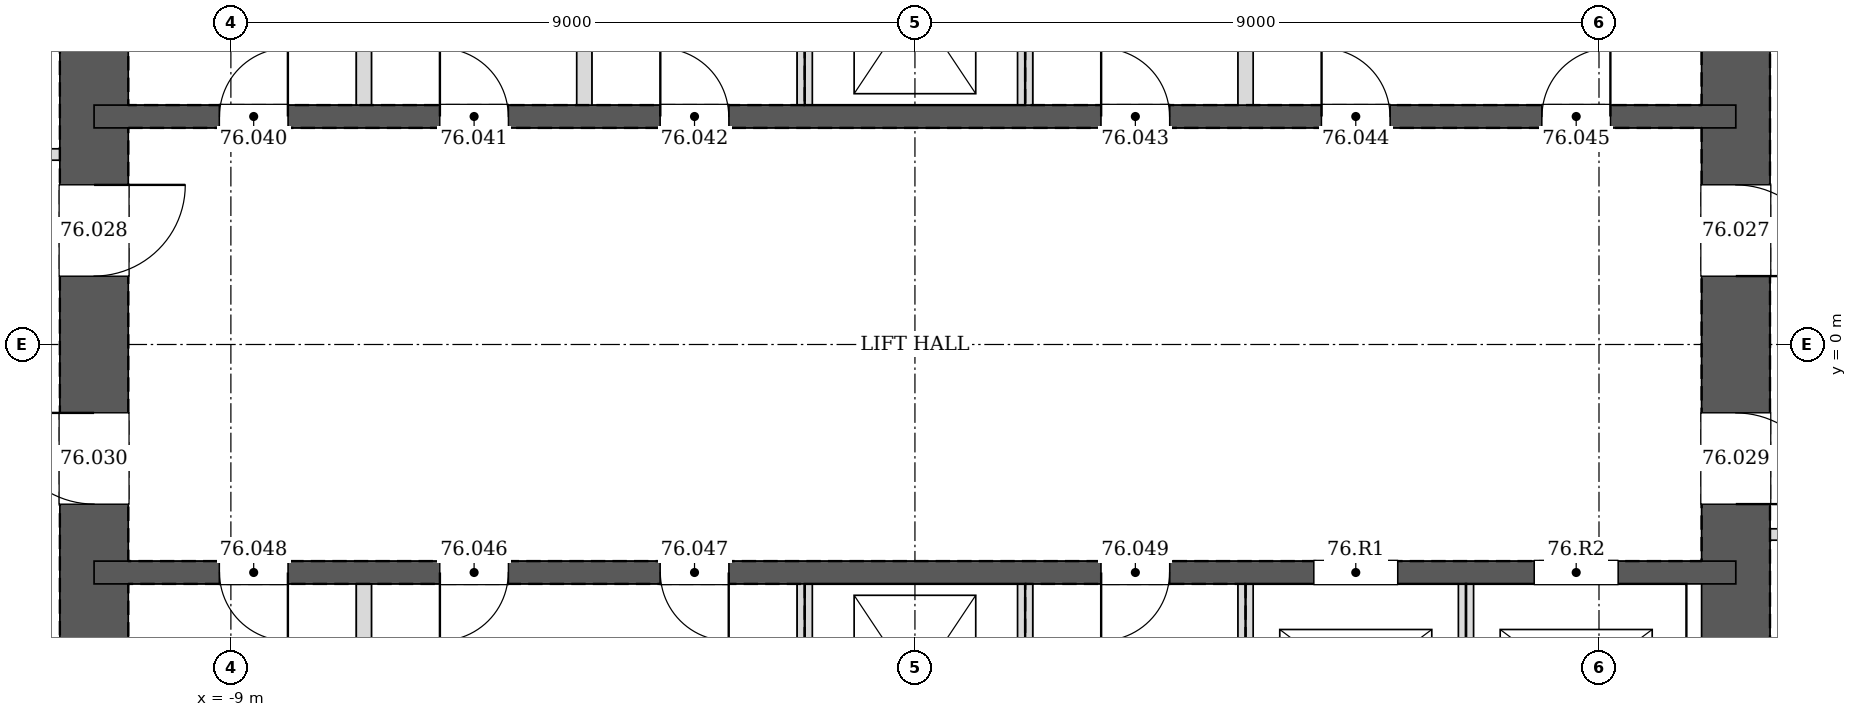
"""IFC4 building model, lengths in metres.
Left out: names, types, materials, properties, quantities, classifications, styles, units other than length and angle.
Written with IfcOpenShell. Run it as: python <this file> out.ifc"""

import sys

from ifc_helpers import new_model, si_unit, direction, frame, frame_2d, origin, place, context, subcontext, project, spatial, rectangle, extrude, element, fill, save


model = new_model("IFC4")
c1 = context("Model", 3, precision=1e-05, world=origin(), true_north=direction((0.0, 1.0)))
c2 = subcontext(c1, "Body", "Model", "MODEL_VIEW")
j1 = project(units=[si_unit("LENGTHUNIT", "METRE"), si_unit("PLANEANGLEUNIT", "RADIAN")], contexts=[c1])
p1 = place(None, origin())
s1 = spatial("IfcSite", under=j1, at=p1, CompositionType="ELEMENT")
p2 = place(p1, origin())
s2 = spatial("IfcBuilding", under=s1, at=p2, CompositionType="ELEMENT")
p3 = place(p2, frame((0.0, 0.0, 308.2)))
s3 = spatial("IfcBuildingStorey", under=s2, at=p3, CompositionType="ELEMENT", Elevation=308.2)
p4 = place(p3, frame((10.8, -10.8, 0.0), z_axis=(0.0, 0.0, 1.0), x_axis=(0.0, 1.0, 0.0)))
e1 = element("IfcWall", 1, at=p4, inside=s3, PredefinedType="SOLIDWALL", context=c2, shape_type="SweptSolid", body=[
    extrude(rectangle(XDim=21.6, YDim=0.9, at=frame_2d((10.8, 0.0))), origin(), (0.0, 0.0, 1.0), 3.4),
])
p5 = place(p4, frame((11.7, 0.0, 0.0)))
e2 = element("IfcOpeningElement", 2, at=p5, cuts=e1, PredefinedType="OPENING", context=c2, shape_type="SweptSolid", body=[
    extrude(rectangle(XDim=1.2, YDim=2.1, at=frame_2d((0.6, 1.05))), frame((0.0, 0.46, 0.0), z_axis=(0.0, -1.0, 0.0), x_axis=(1.0, 0.0, 0.0)), (0.0, 0.0, 1.0), 0.92),
])
p6 = place(p4, frame((8.7, 0.0, 0.0)))
e3 = element("IfcOpeningElement", 3, at=p6, cuts=e1, PredefinedType="OPENING", context=c2, shape_type="SweptSolid", body=[
    extrude(rectangle(XDim=1.2, YDim=2.1, at=frame_2d((0.6, 1.05))), frame((0.0, 0.46, 0.0), z_axis=(0.0, -1.0, 0.0), x_axis=(1.0, 0.0, 0.0)), (0.0, 0.0, 1.0), 0.92),
])
p7 = place(p3, frame((-10.8, 10.8, 0.0), z_axis=(0.0, 0.0, 1.0), x_axis=(0.0, -1.0, 0.0)))
e4 = element("IfcWall", 4, at=p7, inside=s3, PredefinedType="SOLIDWALL", context=c2, shape_type="SweptSolid", body=[
    extrude(rectangle(XDim=21.6, YDim=0.9, at=frame_2d((10.8, 0.0))), origin(), (0.0, 0.0, 1.0), 3.4),
])
p8 = place(p7, frame((8.7, 0.0, 0.0)))
e5 = element("IfcOpeningElement", 5, at=p8, cuts=e4, PredefinedType="OPENING", context=c2, shape_type="SweptSolid", body=[
    extrude(rectangle(XDim=1.2, YDim=2.1, at=frame_2d((0.6, 1.05))), frame((0.0, 0.46, 0.0), z_axis=(0.0, -1.0, 0.0), x_axis=(1.0, 0.0, 0.0)), (0.0, 0.0, 1.0), 0.92),
])
p9 = place(p7, frame((11.7, 0.0, 0.0)))
e6 = element("IfcOpeningElement", 6, at=p9, cuts=e4, PredefinedType="OPENING", context=c2, shape_type="SweptSolid", body=[
    extrude(rectangle(XDim=1.2, YDim=2.1, at=frame_2d((0.6, 1.05))), frame((0.0, 0.46, 0.0), z_axis=(0.0, -1.0, 0.0), x_axis=(1.0, 0.0, 0.0)), (0.0, 0.0, 1.0), 0.92),
])
p10 = place(p3, frame((-10.8, 3.0, 0.0), z_axis=(0.0, 0.0, 1.0), x_axis=(1.0, 0.0, 0.0)))
e7 = element("IfcWall", 7, at=p10, inside=s3, PredefinedType="SOLIDWALL", context=c2, shape_type="SweptSolid", body=[
    extrude(rectangle(XDim=21.6, YDim=0.3, at=frame_2d((10.8, 0.0))), origin(), (0.0, 0.0, 1.0), 3.4),
])
p11 = place(p10, frame((1.65, 0.0, 0.0)))
e8 = element("IfcOpeningElement", 8, at=p11, cuts=e7, PredefinedType="OPENING", context=c2, shape_type="SweptSolid", body=[
    extrude(rectangle(XDim=0.9, YDim=2.1, at=frame_2d((0.45, 1.05))), frame((0.0, 0.16, 0.0), z_axis=(0.0, -1.0, 0.0), x_axis=(1.0, 0.0, 0.0)), (0.0, 0.0, 1.0), 0.32),
])
p12 = place(p10, frame((4.55, 0.0, 0.0)))
e9 = element("IfcOpeningElement", 9, at=p12, cuts=e7, PredefinedType="OPENING", context=c2, shape_type="SweptSolid", body=[
    extrude(rectangle(XDim=0.9, YDim=2.1, at=frame_2d((0.45, 1.05))), frame((0.0, 0.16, 0.0), z_axis=(0.0, -1.0, 0.0), x_axis=(1.0, 0.0, 0.0)), (0.0, 0.0, 1.0), 0.32),
])
p13 = place(p10, frame((7.45, 0.0, 0.0)))
e10 = element("IfcOpeningElement", 10, at=p13, cuts=e7, PredefinedType="OPENING", context=c2, shape_type="SweptSolid", body=[
    extrude(rectangle(XDim=0.9, YDim=2.1, at=frame_2d((0.45, 1.05))), frame((0.0, 0.16, 0.0), z_axis=(0.0, -1.0, 0.0), x_axis=(1.0, 0.0, 0.0)), (0.0, 0.0, 1.0), 0.32),
])
p14 = place(p10, frame((13.25, 0.0, 0.0)))
e11 = element("IfcOpeningElement", 11, at=p14, cuts=e7, PredefinedType="OPENING", context=c2, shape_type="SweptSolid", body=[
    extrude(rectangle(XDim=0.9, YDim=2.1, at=frame_2d((0.45, 1.05))), frame((0.0, 0.16, 0.0), z_axis=(0.0, -1.0, 0.0), x_axis=(1.0, 0.0, 0.0)), (0.0, 0.0, 1.0), 0.32),
])
p15 = place(p10, frame((16.15, 0.0, 0.0)))
e12 = element("IfcOpeningElement", 12, at=p15, cuts=e7, PredefinedType="OPENING", context=c2, shape_type="SweptSolid", body=[
    extrude(rectangle(XDim=0.9, YDim=2.1, at=frame_2d((0.45, 1.05))), frame((0.0, 0.16, 0.0), z_axis=(0.0, -1.0, 0.0), x_axis=(1.0, 0.0, 0.0)), (0.0, 0.0, 1.0), 0.32),
])
p16 = place(p10, frame((19.05, 0.0, 0.0)))
e13 = element("IfcOpeningElement", 13, at=p16, cuts=e7, PredefinedType="OPENING", context=c2, shape_type="SweptSolid", body=[
    extrude(rectangle(XDim=0.9, YDim=2.1, at=frame_2d((0.45, 1.05))), frame((0.0, 0.16, 0.0), z_axis=(0.0, -1.0, 0.0), x_axis=(1.0, 0.0, 0.0)), (0.0, 0.0, 1.0), 0.32),
])
p17 = place(p3, frame((-10.8, -3.0, 0.0), z_axis=(0.0, 0.0, 1.0), x_axis=(1.0, 0.0, 0.0)))
e14 = element("IfcWall", 14, at=p17, inside=s3, PredefinedType="SOLIDWALL", context=c2, shape_type="SweptSolid", body=[
    extrude(rectangle(XDim=21.6, YDim=0.3, at=frame_2d((10.8, 0.0))), origin(), (0.0, 0.0, 1.0), 3.4),
])
p18 = place(p17, frame((4.55, 0.0, 0.0)))
e15 = element("IfcOpeningElement", 15, at=p18, cuts=e14, PredefinedType="OPENING", context=c2, shape_type="SweptSolid", body=[
    extrude(rectangle(XDim=0.9, YDim=2.1, at=frame_2d((0.45, 1.05))), frame((0.0, 0.16, 0.0), z_axis=(0.0, -1.0, 0.0), x_axis=(1.0, 0.0, 0.0)), (0.0, 0.0, 1.0), 0.32),
])
p19 = place(p17, frame((7.45, 0.0, 0.0)))
e16 = element("IfcOpeningElement", 16, at=p19, cuts=e14, PredefinedType="OPENING", context=c2, shape_type="SweptSolid", body=[
    extrude(rectangle(XDim=0.9, YDim=2.1, at=frame_2d((0.45, 1.05))), frame((0.0, 0.16, 0.0), z_axis=(0.0, -1.0, 0.0), x_axis=(1.0, 0.0, 0.0)), (0.0, 0.0, 1.0), 0.32),
])
p20 = place(p17, frame((1.65, 0.0, 0.0)))
e17 = element("IfcOpeningElement", 17, at=p20, cuts=e14, PredefinedType="OPENING", context=c2, shape_type="SweptSolid", body=[
    extrude(rectangle(XDim=0.9, YDim=2.1, at=frame_2d((0.45, 1.05))), frame((0.0, 0.16, 0.0), z_axis=(0.0, -1.0, 0.0), x_axis=(1.0, 0.0, 0.0)), (0.0, 0.0, 1.0), 0.32),
])
p21 = place(p17, frame((13.25, 0.0, 0.0)))
e18 = element("IfcOpeningElement", 18, at=p21, cuts=e14, PredefinedType="OPENING", context=c2, shape_type="SweptSolid", body=[
    extrude(rectangle(XDim=0.9, YDim=2.1, at=frame_2d((0.45, 1.05))), frame((0.0, 0.16, 0.0), z_axis=(0.0, -1.0, 0.0), x_axis=(1.0, 0.0, 0.0)), (0.0, 0.0, 1.0), 0.32),
])
p22 = place(p17, frame((16.05, 0.0, 0.0)))
e19 = element("IfcOpeningElement", 19, at=p22, cuts=e14, PredefinedType="OPENING", context=c2, shape_type="SweptSolid", body=[
    extrude(rectangle(XDim=1.1, YDim=2.1, at=frame_2d((0.55, 1.05))), frame((0.0, 0.16, 0.0), z_axis=(0.0, -1.0, 0.0), x_axis=(1.0, 0.0, 0.0)), (0.0, 0.0, 1.0), 0.32),
])
p23 = place(p17, frame((18.95, 0.0, 0.0)))
e20 = element("IfcOpeningElement", 20, at=p23, cuts=e14, PredefinedType="OPENING", context=c2, shape_type="SweptSolid", body=[
    extrude(rectangle(XDim=1.1, YDim=2.1, at=frame_2d((0.55, 1.05))), frame((0.0, 0.16, 0.0), z_axis=(0.0, -1.0, 0.0), x_axis=(1.0, 0.0, 0.0)), (0.0, 0.0, 1.0), 0.32),
])
p24 = place(p3, frame((11.25, -2.5, 0.0), z_axis=(0.0, 0.0, 1.0), x_axis=(1.0, 0.0, 0.0)))
e21 = element("IfcWall", 21, at=p24, inside=s3, PredefinedType="PARTITIONING", context=c2, shape_type="SweptSolid", body=[
    extrude(rectangle(XDim=1.65, YDim=0.15, at=frame_2d((0.825, 0.0))), origin(), (0.0, 0.0, 1.0), 3.2),
])
p25 = place(p3, frame((-11.25, 2.5, 0.0), z_axis=(0.0, 0.0, 1.0), x_axis=(-1.0, 0.0, 0.0)))
e22 = element("IfcWall", 22, at=p25, inside=s3, PredefinedType="PARTITIONING", context=c2, shape_type="SweptSolid", body=[
    extrude(rectangle(XDim=1.65, YDim=0.15, at=frame_2d((0.825, 0.0))), origin(), (0.0, 0.0, 1.0), 3.2),
])
p26 = place(p25, frame((0.35, 0.0, 0.0)))
e23 = element("IfcOpeningElement", 23, at=p26, cuts=e22, PredefinedType="OPENING", context=c2, shape_type="SweptSolid", body=[
    extrude(rectangle(XDim=0.95, YDim=2.1, at=frame_2d((0.475, 1.05))), frame((0.0, 0.085, 0.0), z_axis=(0.0, -1.0, 0.0), x_axis=(1.0, 0.0, 0.0)), (0.0, 0.0, 1.0), 0.17),
])
for number, where, z_axis, x_axis in (
    (24, (-7.25, 3.15, 0.0), (0.0, 0.0, 1.0), (0.0, 1.0, 0.0)),
    (25, (-4.35, 3.15, 0.0), (0.0, 0.0, 1.0), (0.0, 1.0, 0.0)),
    (26, (-1.45, 3.15, 0.0), (0.0, 0.0, 1.0), (0.0, 1.0, 0.0)),
    (27, (1.45, 3.15, 0.0), (0.0, 0.0, 1.0), (0.0, 1.0, 0.0)),
    (28, (4.35, 3.15, 0.0), (0.0, 0.0, 1.0), (0.0, 1.0, 0.0)),
    (29, (-7.25, -5.85, 0.0), (0.0, 0.0, 1.0), (0.0, 1.0, 0.0)),
    (30, (-1.45, -5.85, 0.0), (0.0, 0.0, 1.0), (0.0, 1.0, 0.0)),
    (31, (1.45, -5.85, 0.0), (0.0, 0.0, 1.0), (0.0, 1.0, 0.0)),
    (32, (4.35, -5.85, 0.0), (0.0, 0.0, 1.0), (0.0, 1.0, 0.0)),
):
    element("IfcWall", number, at=place(p3, frame(where, z_axis=z_axis, x_axis=x_axis)), inside=s3, PredefinedType="PARTITIONING", context=c2, shape_type="SweptSolid", body=[
        extrude(rectangle(XDim=2.7, YDim=0.2, at=frame_2d((1.35, 0.0))), origin(), (0.0, 0.0, 1.0), 3.2),
    ])
p27 = place(p3, frame((7.25, -5.85, 0.0), z_axis=(0.0, 0.0, 1.0), x_axis=(0.0, 1.0, 0.0)))
e33 = element("IfcWall", 33, at=p27, inside=s3, PredefinedType="PARTITIONING", context=c2, shape_type="SweptSolid", body=[
    extrude(rectangle(XDim=2.7, YDim=0.2, at=frame_2d((1.35, 0.0))), origin(), (0.0, 0.0, 1.0), 3.4),
])
p28 = place(p5, frame((1.2, 0.0, 0.0), z_axis=(0.0, 0.0, 1.0), x_axis=(-1.0, 0.0, 0.0)))
e34 = element("IfcDoor", 34, at=p28, inside=s3, OperationType="SINGLE_SWING_RIGHT", PredefinedType="DOOR", context=c2, shape_type="SweptSolid", body=[
    extrude(rectangle(XDim=1.2, YDim=2.1, at=frame_2d((0.6, 1.05))), frame((0.0, 0.025, 0.0), z_axis=(0.0, -1.0, 0.0), x_axis=(1.0, 0.0, 0.0)), (0.0, 0.0, 1.0), 0.05),
])
fill(e2, e34)
p29 = place(p8, origin())
e35 = element("IfcDoor", 35, at=p29, inside=s3, OperationType="SINGLE_SWING_LEFT", PredefinedType="DOOR", context=c2, shape_type="SweptSolid", body=[
    extrude(rectangle(XDim=1.2, YDim=2.1, at=frame_2d((0.6, 1.05))), frame((0.0, 0.025, 0.0), z_axis=(0.0, -1.0, 0.0), x_axis=(1.0, 0.0, 0.0)), (0.0, 0.0, 1.0), 0.05),
])
fill(e5, e35)
p30 = place(p6, frame((1.2, 0.0, 0.0), z_axis=(0.0, 0.0, 1.0), x_axis=(-1.0, 0.0, 0.0)))
e36 = element("IfcDoor", 36, at=p30, inside=s3, OperationType="SINGLE_SWING_RIGHT", PredefinedType="DOOR", context=c2, shape_type="SweptSolid", body=[
    extrude(rectangle(XDim=1.2, YDim=2.1, at=frame_2d((0.6, 1.05))), frame((0.0, 0.025, 0.0), z_axis=(0.0, -1.0, 0.0), x_axis=(1.0, 0.0, 0.0)), (0.0, 0.0, 1.0), 0.05),
])
fill(e3, e36)
p31 = place(p9, frame((1.2, 0.0, 0.0), z_axis=(0.0, 0.0, 1.0), x_axis=(-1.0, 0.0, 0.0)))
e37 = element("IfcDoor", 37, at=p31, inside=s3, OperationType="SINGLE_SWING_RIGHT", PredefinedType="DOOR", context=c2, shape_type="SweptSolid", body=[
    extrude(rectangle(XDim=1.2, YDim=2.1, at=frame_2d((0.6, 1.05))), frame((0.0, 0.025, 0.0), z_axis=(0.0, -1.0, 0.0), x_axis=(1.0, 0.0, 0.0)), (0.0, 0.0, 1.0), 0.05),
])
fill(e6, e37)
p32 = place(p11, origin())
e38 = element("IfcDoor", 38, at=p32, inside=s3, OperationType="SINGLE_SWING_RIGHT", PredefinedType="DOOR", context=c2, shape_type="SweptSolid", body=[
    extrude(rectangle(XDim=0.9, YDim=2.1, at=frame_2d((0.45, 1.05))), frame((0.0, 0.025, 0.0), z_axis=(0.0, -1.0, 0.0), x_axis=(1.0, 0.0, 0.0)), (0.0, 0.0, 1.0), 0.05),
])
fill(e8, e38)
p33 = place(p12, origin())
e39 = element("IfcDoor", 39, at=p33, inside=s3, OperationType="SINGLE_SWING_LEFT", PredefinedType="DOOR", context=c2, shape_type="SweptSolid", body=[
    extrude(rectangle(XDim=0.9, YDim=2.1, at=frame_2d((0.45, 1.05))), frame((0.0, 0.025, 0.0), z_axis=(0.0, -1.0, 0.0), x_axis=(1.0, 0.0, 0.0)), (0.0, 0.0, 1.0), 0.05),
])
fill(e9, e39)
p34 = place(p13, origin())
e40 = element("IfcDoor", 40, at=p34, inside=s3, OperationType="SINGLE_SWING_LEFT", PredefinedType="DOOR", context=c2, shape_type="SweptSolid", body=[
    extrude(rectangle(XDim=0.9, YDim=2.1, at=frame_2d((0.45, 1.05))), frame((0.0, 0.025, 0.0), z_axis=(0.0, -1.0, 0.0), x_axis=(1.0, 0.0, 0.0)), (0.0, 0.0, 1.0), 0.05),
])
fill(e10, e40)
p35 = place(p14, origin())
e41 = element("IfcDoor", 41, at=p35, inside=s3, OperationType="SINGLE_SWING_LEFT", PredefinedType="DOOR", context=c2, shape_type="SweptSolid", body=[
    extrude(rectangle(XDim=0.9, YDim=2.1, at=frame_2d((0.45, 1.05))), frame((0.0, 0.025, 0.0), z_axis=(0.0, -1.0, 0.0), x_axis=(1.0, 0.0, 0.0)), (0.0, 0.0, 1.0), 0.05),
])
fill(e11, e41)
p36 = place(p15, origin())
e42 = element("IfcDoor", 42, at=p36, inside=s3, OperationType="SINGLE_SWING_LEFT", PredefinedType="DOOR", context=c2, shape_type="SweptSolid", body=[
    extrude(rectangle(XDim=0.9, YDim=2.1, at=frame_2d((0.45, 1.05))), frame((0.0, 0.025, 0.0), z_axis=(0.0, -1.0, 0.0), x_axis=(1.0, 0.0, 0.0)), (0.0, 0.0, 1.0), 0.05),
])
fill(e12, e42)
p37 = place(p16, origin())
e43 = element("IfcDoor", 43, at=p37, inside=s3, OperationType="SINGLE_SWING_RIGHT", PredefinedType="DOOR", context=c2, shape_type="SweptSolid", body=[
    extrude(rectangle(XDim=0.9, YDim=2.1, at=frame_2d((0.45, 1.05))), frame((0.0, 0.025, 0.0), z_axis=(0.0, -1.0, 0.0), x_axis=(1.0, 0.0, 0.0)), (0.0, 0.0, 1.0), 0.05),
])
fill(e13, e43)
p38 = place(p18, frame((0.9, 0.0, 0.0), z_axis=(0.0, 0.0, 1.0), x_axis=(-1.0, 0.0, 0.0)))
e44 = element("IfcDoor", 44, at=p38, inside=s3, OperationType="SINGLE_SWING_RIGHT", PredefinedType="DOOR", context=c2, shape_type="SweptSolid", body=[
    extrude(rectangle(XDim=0.9, YDim=2.1, at=frame_2d((0.45, 1.05))), frame((0.0, 0.025, 0.0), z_axis=(0.0, -1.0, 0.0), x_axis=(1.0, 0.0, 0.0)), (0.0, 0.0, 1.0), 0.05),
])
fill(e15, e44)
p39 = place(p19, frame((0.9, 0.0, 0.0), z_axis=(0.0, 0.0, 1.0), x_axis=(-1.0, 0.0, 0.0)))
e45 = element("IfcDoor", 45, at=p39, inside=s3, OperationType="SINGLE_SWING_LEFT", PredefinedType="DOOR", context=c2, shape_type="SweptSolid", body=[
    extrude(rectangle(XDim=0.9, YDim=2.1, at=frame_2d((0.45, 1.05))), frame((0.0, 0.025, 0.0), z_axis=(0.0, -1.0, 0.0), x_axis=(1.0, 0.0, 0.0)), (0.0, 0.0, 1.0), 0.05),
])
fill(e16, e45)
p40 = place(p20, frame((0.9, 0.0, 0.0), z_axis=(0.0, 0.0, 1.0), x_axis=(-1.0, 0.0, 0.0)))
e46 = element("IfcDoor", 46, at=p40, inside=s3, OperationType="SINGLE_SWING_LEFT", PredefinedType="DOOR", context=c2, shape_type="SweptSolid", body=[
    extrude(rectangle(XDim=0.9, YDim=2.1, at=frame_2d((0.45, 1.05))), frame((0.0, 0.025, 0.0), z_axis=(0.0, -1.0, 0.0), x_axis=(1.0, 0.0, 0.0)), (0.0, 0.0, 1.0), 0.05),
])
fill(e17, e46)
p41 = place(p21, frame((0.9, 0.0, 0.0), z_axis=(0.0, 0.0, 1.0), x_axis=(-1.0, 0.0, 0.0)))
e47 = element("IfcDoor", 47, at=p41, inside=s3, OperationType="SINGLE_SWING_RIGHT", PredefinedType="DOOR", context=c2, shape_type="SweptSolid", body=[
    extrude(rectangle(XDim=0.9, YDim=2.1, at=frame_2d((0.45, 1.05))), frame((0.0, 0.025, 0.0), z_axis=(0.0, -1.0, 0.0), x_axis=(1.0, 0.0, 0.0)), (0.0, 0.0, 1.0), 0.05),
])
fill(e18, e47)
p42 = place(p22, origin())
e48 = element("IfcDoor", 48, at=p42, inside=s3, OperationType="DOUBLE_DOOR_SLIDING", PredefinedType="DOOR", context=c2, shape_type="SweptSolid", body=[
    extrude(rectangle(XDim=1.1, YDim=2.1, at=frame_2d((0.55, 1.05))), frame((0.0, 0.025, 0.0), z_axis=(0.0, -1.0, 0.0), x_axis=(1.0, 0.0, 0.0)), (0.0, 0.0, 1.0), 0.05),
])
fill(e19, e48)
p43 = place(p23, origin())
e49 = element("IfcDoor", 49, at=p43, inside=s3, OperationType="DOUBLE_DOOR_SLIDING", PredefinedType="DOOR", context=c2, shape_type="SweptSolid", body=[
    extrude(rectangle(XDim=1.1, YDim=2.1, at=frame_2d((0.55, 1.05))), frame((0.0, 0.025, 0.0), z_axis=(0.0, -1.0, 0.0), x_axis=(1.0, 0.0, 0.0)), (0.0, 0.0, 1.0), 0.05),
])
fill(e20, e49)
save(model, sys.argv[1])
